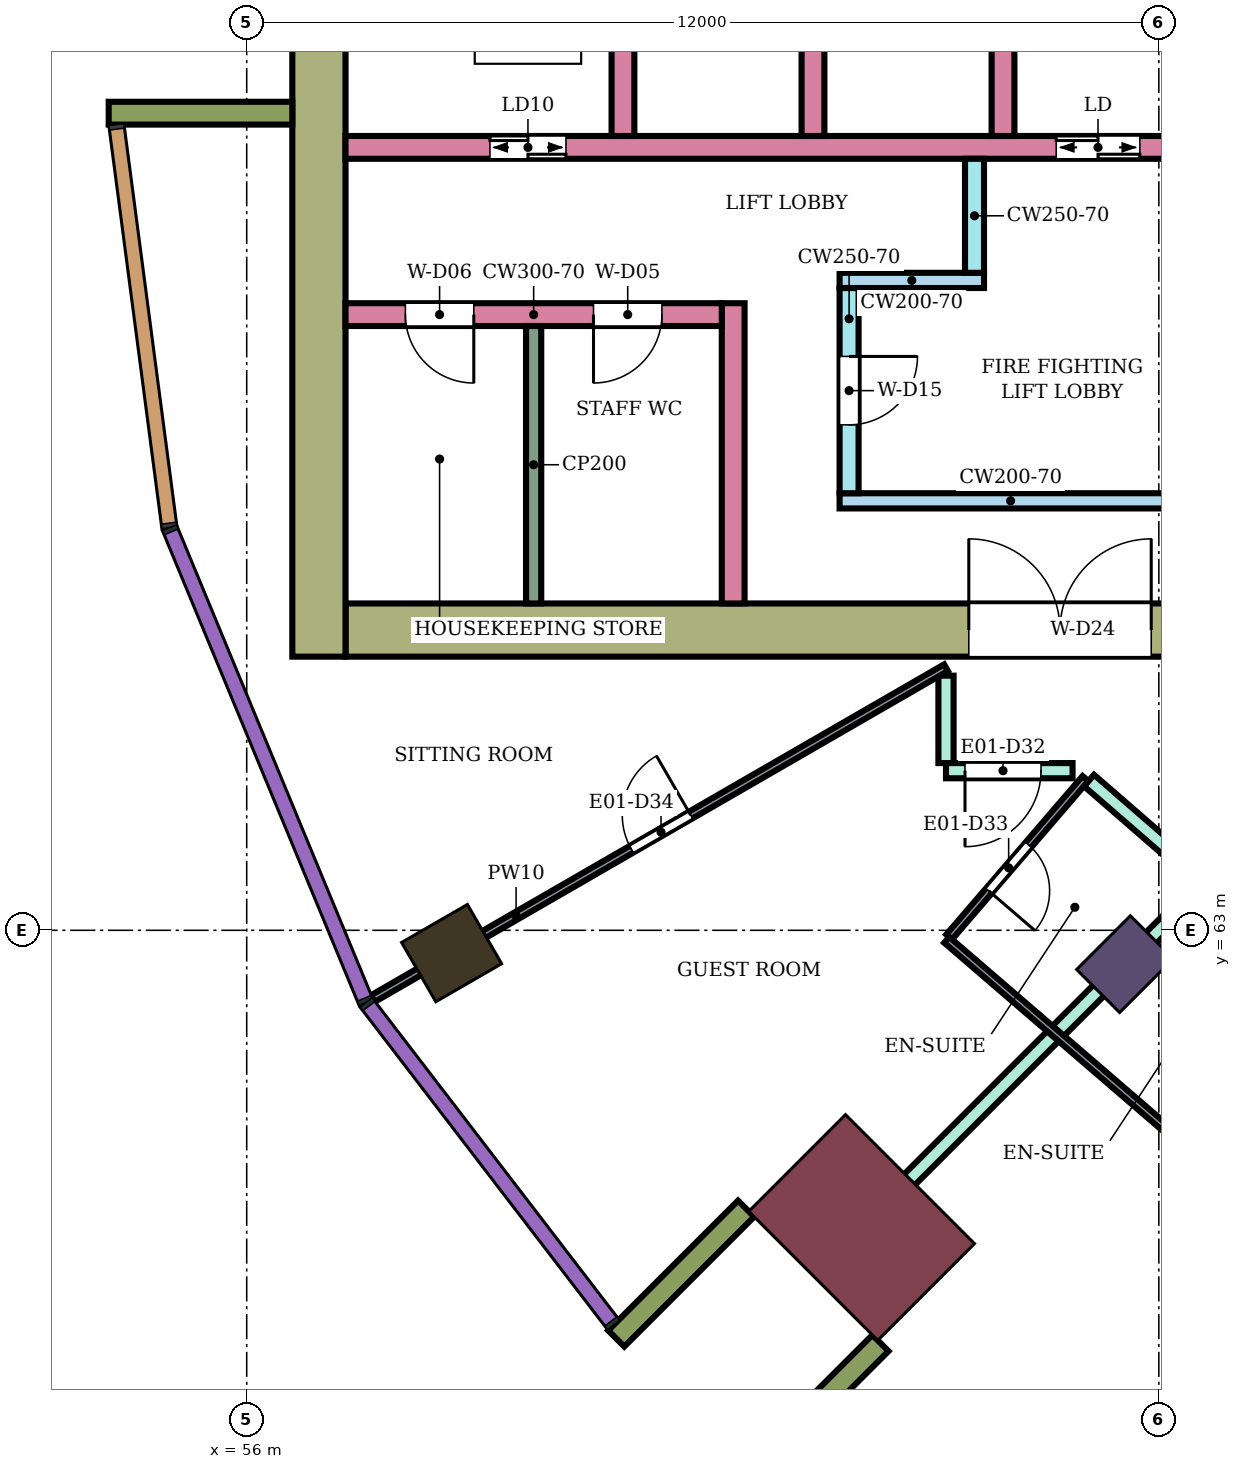
"""IFC4 building model, lengths in metres.
Left out: names, types, materials, properties, quantities, classifications, styles, units other than length and angle.
Written with IfcOpenShell. Run it as: python <this file> out.ifc"""

import sys

from ifc_helpers import new_model, si_unit, direction, frame, frame_2d, origin, origin_2d, place, context, subcontext, project, spatial, rectangle, extrude, element, fill, save


model = new_model("IFC4")
c1 = context("Model", 3, precision=1e-05, world=origin(), true_north=direction((0.0, 1.0)))
c2 = subcontext(c1, "Body", "Model", "MODEL_VIEW")
j1 = project(units=[si_unit("LENGTHUNIT", "METRE"), si_unit("PLANEANGLEUNIT", "RADIAN")], contexts=[c1])
p1 = place(None, origin())
s1 = spatial("IfcSite", under=j1, at=p1, CompositionType="ELEMENT")
p2 = place(p1, origin())
s2 = spatial("IfcBuilding", under=s1, at=p2, CompositionType="ELEMENT")
p3 = place(p2, frame((0.0, 0.0, 122.4)))
s3 = spatial("IfcBuildingStorey", under=s2, at=p3, CompositionType="ELEMENT", Elevation=122.4)
p4 = place(p3, frame((58.696, 62.7, 0.0), z_axis=(0.0, 0.0, 1.0), x_axis=(-0.866025403784, -0.5, 0.0)))
e1 = element("IfcColumn", 1, at=p4, inside=s3, PredefinedType="COLUMN", context=c2, shape_type="SweptSolid", body=[
    extrude(rectangle(XDim=1.0, YDim=0.9, at=origin_2d()), origin(), (0.0, 0.0, 1.0), 3.9),
])
p5 = place(p3, frame((67.555, 62.555, 0.0), z_axis=(0.0, 0.0, 1.0), x_axis=(-0.707106781187, -0.707106781187, 0.0)))
e2 = element("IfcColumn", 2, at=p5, inside=s3, PredefinedType="COLUMN", context=c2, shape_type="SweptSolid", body=[
    extrude(rectangle(XDim=1.0, YDim=0.8, at=origin_2d()), origin(), (0.0, 0.0, 1.0), 3.9),
])
p6 = place(p3, frame((64.09, 59.09, 0.0), z_axis=(0.0, 0.0, 1.0), x_axis=(-0.707106781187, -0.707106781187, 0.0)))
e3 = element("IfcColumn", 3, at=p6, inside=s3, PredefinedType="COLUMN", context=c2, shape_type="SweptSolid", body=[
    extrude(rectangle(XDim=1.8, YDim=2.4, at=origin_2d()), origin(), (0.0, 0.0, 1.0), 3.9),
])
p7 = place(p3, frame((72.1, 66.95, 0.0), z_axis=(0.0, 0.0, 1.0), x_axis=(-1.0, 0.0, 0.0)))
e4 = element("IfcWall", 4, at=p7, inside=s3, PredefinedType="SHEAR", context=c2, shape_type="SweptSolid", body=[
    extrude(rectangle(XDim=14.8, YDim=0.7, at=frame_2d((7.4, 0.0))), origin(), (0.0, 0.0, 1.0), 3.58),
])
p8 = place(p7, frame((4.2, 0.0, 0.0)))
e5 = element("IfcOpeningElement", 5, at=p8, cuts=e4, PredefinedType="OPENING", context=c2, shape_type="SweptSolid", body=[
    extrude(rectangle(XDim=2.4, YDim=2.4, at=frame_2d((1.2, 1.2))), frame((0.0, 0.36, 0.0), z_axis=(0.0, -1.0, 0.0), x_axis=(1.0, 0.0, 0.0)), (0.0, 0.0, 1.0), 0.72),
])
p9 = place(p3, frame((56.95, 83.4, 0.0), z_axis=(0.0, 0.0, 1.0), x_axis=(0.0, -1.0, 0.0)))
e6 = element("IfcWall", 6, at=p9, inside=s3, PredefinedType="SHEAR", context=c2, shape_type="SweptSolid", body=[
    extrude(rectangle(XDim=16.8, YDim=0.7, at=frame_2d((8.4, 0.0))), origin(), (0.0, 0.0, 1.0), 3.58),
])
p10 = place(p3, frame((68.3, 73.3, 0.0), z_axis=(0.0, 0.0, 1.0), x_axis=(-1.0, 0.0, 0.0)))
e7 = element("IfcWall", 7, at=p10, inside=s3, PredefinedType="SHEAR", context=c2, shape_type="SweptSolid", body=[
    extrude(rectangle(XDim=11.0, YDim=0.3, at=frame_2d((5.5, 0.0))), origin(), (0.0, 0.0, 1.0), 3.58),
])
p11 = place(p10, frame((0.55, 0.0, 0.0)))
e8 = element("IfcOpeningElement", 8, at=p11, cuts=e7, PredefinedType="OPENING", context=c2, shape_type="SweptSolid", body=[
    extrude(rectangle(XDim=1.1, YDim=2.1, at=frame_2d((0.55, 1.05))), frame((0.0, 0.16, 0.0), z_axis=(0.0, -1.0, 0.0), x_axis=(1.0, 0.0, 0.0)), (0.0, 0.0, 1.0), 0.32),
])
p12 = place(p10, frame((8.1, 0.0, 0.0)))
e9 = element("IfcOpeningElement", 9, at=p12, cuts=e7, PredefinedType="OPENING", context=c2, shape_type="SweptSolid", body=[
    extrude(rectangle(XDim=1.0, YDim=2.1, at=frame_2d((0.5, 1.05))), frame((0.0, 0.16, 0.0), z_axis=(0.0, -1.0, 0.0), x_axis=(1.0, 0.0, 0.0)), (0.0, 0.0, 1.0), 0.32),
])
for number, where, z_axis, x_axis in (
    (10, (65.95, 76.0, 0.0), (0.0, 0.0, 1.0), (0.0, -1.0, 0.0)),
    (11, (63.45, 76.0, 0.0), (0.0, 0.0, 1.0), (0.0, -1.0, 0.0)),
    (12, (60.95, 76.0, 0.0), (0.0, 0.0, 1.0), (0.0, -1.0, 0.0)),
):
    element("IfcWall", number, at=place(p3, frame(where, z_axis=z_axis, x_axis=x_axis)), inside=s3, PredefinedType="SHEAR", context=c2, shape_type="SweptSolid", body=[
        extrude(rectangle(XDim=2.55, YDim=0.3, at=frame_2d((1.275, 0.0))), origin(), (0.0, 0.0, 1.0), 3.58),
    ])
p13 = place(p3, frame((68.3, 68.65, 0.0), z_axis=(0.0, 0.0, 1.0), x_axis=(-1.0, 0.0, 0.0)))
e13 = element("IfcWall", 13, at=p13, inside=s3, PredefinedType="SHEAR", context=c2, shape_type="SweptSolid", body=[
    extrude(rectangle(XDim=4.5, YDim=0.2, at=frame_2d((2.25, 0.0))), origin(), (0.0, 0.0, 1.0), 3.58),
])
p14 = place(p3, frame((63.925, 71.45, 0.0), z_axis=(0.0, 0.0, 1.0), x_axis=(0.0, -1.0, 0.0)))
e14 = element("IfcWall", 14, at=p14, inside=s3, PredefinedType="SHEAR", context=c2, shape_type="SweptSolid", body=[
    extrude(rectangle(XDim=2.7, YDim=0.25, at=frame_2d((1.35, 0.0))), origin(), (0.0, 0.0, 1.0), 3.58),
])
p15 = place(p14, frame((0.9, 0.0, 0.0)))
e15 = element("IfcOpeningElement", 15, at=p15, cuts=e14, PredefinedType="OPENING", context=c2, shape_type="SweptSolid", body=[
    extrude(rectangle(XDim=0.9, YDim=2.1, at=frame_2d((0.45, 1.05))), frame((0.0, 0.135, 0.0), z_axis=(0.0, -1.0, 0.0), x_axis=(1.0, 0.0, 0.0)), (0.0, 0.0, 1.0), 0.27),
])
p16 = place(p3, frame((65.7, 71.55, 0.0), z_axis=(0.0, 0.0, 1.0), x_axis=(-1.0, 0.0, 0.0)))
e16 = element("IfcWall", 16, at=p16, inside=s3, PredefinedType="SHEAR", context=c2, shape_type="SweptSolid", body=[
    extrude(rectangle(XDim=1.9, YDim=0.2, at=frame_2d((0.95, 0.0))), origin(), (0.0, 0.0, 1.0), 3.58),
])
p17 = place(p3, frame((65.575, 73.15, 0.0), z_axis=(0.0, 0.0, 1.0), x_axis=(0.0, -1.0, 0.0)))
e17 = element("IfcWall", 17, at=p17, inside=s3, PredefinedType="SHEAR", context=c2, shape_type="SweptSolid", body=[
    extrude(rectangle(XDim=1.5, YDim=0.25, at=frame_2d((0.75, 0.0))), origin(), (0.0, 0.0, 1.0), 3.58),
])
p18 = place(p3, frame((62.4, 71.25, 0.0), z_axis=(0.0, 0.0, 1.0), x_axis=(0.0, -1.0, 0.0)))
e18 = element("IfcWall", 18, at=p18, inside=s3, PredefinedType="SHEAR", context=c2, shape_type="SweptSolid", body=[
    extrude(rectangle(XDim=3.95, YDim=0.3, at=frame_2d((1.975, 0.0))), origin(), (0.0, 0.0, 1.0), 3.58),
])
p19 = place(p3, frame((62.25, 71.1, 0.0), z_axis=(0.0, 0.0, 1.0), x_axis=(-1.0, 0.0, 0.0)))
e19 = element("IfcWall", 19, at=p19, inside=s3, PredefinedType="SHEAR", context=c2, shape_type="SweptSolid", body=[
    extrude(rectangle(XDim=4.95, YDim=0.3, at=frame_2d((2.475, 0.0))), origin(), (0.0, 0.0, 1.0), 3.58),
])
p20 = place(p19, frame((0.788, 0.0, 0.0)))
e20 = element("IfcOpeningElement", 20, at=p20, cuts=e19, PredefinedType="OPENING", context=c2, shape_type="SweptSolid", body=[
    extrude(rectangle(XDim=0.9, YDim=2.1, at=frame_2d((0.45, 1.05))), frame((0.0, 0.16, 0.0), z_axis=(0.0, -1.0, 0.0), x_axis=(1.0, 0.0, 0.0)), (0.0, 0.0, 1.0), 0.32),
])
p21 = place(p19, frame((3.262, 0.0, 0.0)))
e21 = element("IfcOpeningElement", 21, at=p21, cuts=e19, PredefinedType="OPENING", context=c2, shape_type="SweptSolid", body=[
    extrude(rectangle(XDim=0.9, YDim=2.1, at=frame_2d((0.45, 1.05))), frame((0.0, 0.16, 0.0), z_axis=(0.0, -1.0, 0.0), x_axis=(1.0, 0.0, 0.0)), (0.0, 0.0, 1.0), 0.32),
])
for number, where, z_axis, x_axis in (
    (22, (56.6, 73.75, 0.0), (0.0, 0.0, 1.0), (-1.0, 0.0, 0.0)),
    (23, (62.57, 59.338, 0.0), (0.0, 0.0, 1.0), (-0.707, -0.707, 0.0)),
    (24, (64.338, 57.57, 0.0), (0.0, 0.0, 1.0), (-0.707, -0.707, 0.0)),
):
    element("IfcWall", number, at=place(p3, frame(where, z_axis=z_axis, x_axis=x_axis)), inside=s3, PredefinedType="NOTDEFINED", context=c2, shape_type="SweptSolid", body=[
        extrude(rectangle(XDim=2.416, YDim=0.3, at=frame_2d((1.208, 0.0))), origin(), (0.0, 0.0, 1.0), 3.9),
    ])
p22 = place(p3, frame((63.596, 58.596, 0.0), z_axis=(0.0, 0.0, 1.0), x_axis=(0.707106781187, 0.707106781187, 0.0)))
e25 = element("IfcWall", 25, at=p22, inside=s3, PredefinedType="PARTITIONING", context=c2, shape_type="SweptSolid", body=[
    extrude(rectangle(XDim=7.005, YDim=0.2, at=frame_2d((3.503, 0.0))), origin(), (0.0, 0.0, 1.0), 3.45),
])
p23 = place(p3, frame((65.2, 65.2, 0.0), z_axis=(0.0, 0.0, 1.0), x_axis=(0.0, 1.0, 0.0)))
e26 = element("IfcWall", 26, at=p23, inside=s3, PredefinedType="PARTITIONING", context=c2, shape_type="SweptSolid", body=[
    extrude(rectangle(XDim=1.15, YDim=0.2, at=frame_2d((0.575, 0.0))), origin(), (0.0, 0.0, 1.0), 3.45),
])
p24 = place(p3, frame((65.2, 65.1, 0.0), z_axis=(0.0, 0.0, 1.0), x_axis=(1.0, 0.0, 0.0)))
e27 = element("IfcWall", 27, at=p24, inside=s3, PredefinedType="PARTITIONING", context=c2, shape_type="SweptSolid", body=[
    extrude(rectangle(XDim=1.665, YDim=0.2, at=frame_2d((0.833, 0.0))), origin(), (0.0, 0.0, 1.0), 3.45),
])
p25 = place(p24, frame((0.25, 0.0, 0.0)))
e28 = element("IfcOpeningElement", 28, at=p25, cuts=e27, PredefinedType="OPENING", context=c2, shape_type="SweptSolid", body=[
    extrude(rectangle(XDim=1.0, YDim=2.1, at=frame_2d((0.5, 1.05))), frame((0.0, 0.11, 0.0), z_axis=(0.0, -1.0, 0.0), x_axis=(1.0, 0.0, 0.0)), (0.0, 0.0, 1.0), 0.22),
])
p26 = place(p3, frame((67.081, 64.971, 0.0), z_axis=(0.0, 0.0, 1.0), x_axis=(0.755031061605, -0.65568902386, 0.0)))
e29 = element("IfcWall", 29, at=p26, inside=s3, PredefinedType="PARTITIONING", context=c2, shape_type="SweptSolid", body=[
    extrude(rectangle(XDim=6.186, YDim=0.2, at=frame_2d((3.093, 0.0))), origin(), (0.0, 0.0, 1.0), 3.45),
])
p27 = place(p26, frame((4.755, 0.0, 0.0)))
e30 = element("IfcOpeningElement", 30, at=p27, cuts=e29, PredefinedType="OPENING", context=c2, shape_type="SweptSolid", body=[
    extrude(rectangle(XDim=1.0, YDim=2.1, at=frame_2d((0.5, 1.05))), frame((0.0, 0.11, 0.0), z_axis=(0.0, -1.0, 0.0), x_axis=(1.0, 0.0, 0.0)), (0.0, 0.0, 1.0), 0.22),
])
p28 = place(p3, frame((67.094, 52.663, 0.0), z_axis=(0.0, 0.0, 1.0), x_axis=(0.500228134253, 0.865893650342, 0.0)))
e31 = element("IfcWall", 31, at=p28, inside=s3, PredefinedType="PARTITIONING", context=c2, shape_type="SweptSolid", body=[
    extrude(rectangle(XDim=9.375, YDim=0.2, at=frame_2d((4.687, 0.0))), origin(), (0.0, 0.0, 1.0), 3.45),
])
p29 = place(p3, frame((57.659, 62.101, 0.0), z_axis=(0.0, 0.0, 1.0), x_axis=(0.86602264145, 0.500004784474, 0.0)))
e32 = element("IfcWall", 32, at=p29, inside=s3, PredefinedType="PARTITIONING", context=c2, shape_type="SweptSolid", body=[
    extrude(rectangle(XDim=8.708, YDim=0.1, at=frame_2d((4.354, 0.0))), origin(), (0.0, 0.0, 1.0), 3.45),
])
p30 = place(p29, frame((3.929, 0.0, 0.0)))
e33 = element("IfcOpeningElement", 33, at=p30, cuts=e32, PredefinedType="OPENING", context=c2, shape_type="SweptSolid", body=[
    extrude(rectangle(XDim=0.9, YDim=2.1, at=frame_2d((0.45, 1.05))), frame((0.0, 0.06, 0.0), z_axis=(0.0, -1.0, 0.0), x_axis=(1.0, 0.0, 0.0)), (0.0, 0.0, 1.0), 0.12),
])
p31 = place(p3, frame((65.242, 62.912, 0.0), z_axis=(0.0, 0.0, 1.0), x_axis=(0.652069888227, 0.758158862553, 0.0)))
e34 = element("IfcWall", 34, at=p31, inside=s3, PredefinedType="PARTITIONING", context=c2, shape_type="SweptSolid", body=[
    extrude(rectangle(XDim=2.75, YDim=0.1, at=frame_2d((1.375, 0.0))), origin(), (0.0, 0.0, 1.0), 3.45),
])
p32 = place(p31, frame((0.8, 0.0, 0.0)))
e35 = element("IfcOpeningElement", 35, at=p32, cuts=e34, PredefinedType="OPENING", context=c2, shape_type="SweptSolid", body=[
    extrude(rectangle(XDim=0.8, YDim=2.1, at=frame_2d((0.4, 1.05))), frame((0.0, 0.06, 0.0), z_axis=(0.0, -1.0, 0.0), x_axis=(1.0, 0.0, 0.0)), (0.0, 0.0, 1.0), 0.12),
])
p33 = place(p3, frame((65.209, 62.875, 0.0), z_axis=(0.0, 0.0, 1.0), x_axis=(0.757930378138, -0.652335451969, 0.0)))
e36 = element("IfcWall", 36, at=p33, inside=s3, PredefinedType="PARTITIONING", context=c2, shape_type="SweptSolid", body=[
    extrude(rectangle(XDim=4.15, YDim=0.1, at=frame_2d((2.075, 0.0))), origin(), (0.0, 0.0, 1.0), 3.45),
])
p34 = place(p3, frame((59.775, 70.95, 0.0), z_axis=(0.0, 0.0, 1.0), x_axis=(0.0, -1.0, 0.0)))
e37 = element("IfcWall", 37, at=p34, inside=s3, PredefinedType="PARTITIONING", context=c2, shape_type="SweptSolid", body=[
    extrude(rectangle(XDim=3.65, YDim=0.2, at=frame_2d((1.825, 0.0))), origin(), (0.0, 0.0, 1.0), 3.58),
])
p35 = place(p25, frame((1.0, 0.0, 0.0), z_axis=(0.0, 0.0, 1.0), x_axis=(-1.0, 0.0, 0.0)))
e38 = element("IfcDoor", 38, at=p35, inside=s3, OperationType="SINGLE_SWING_RIGHT", PredefinedType="DOOR", context=c2, shape_type="SweptSolid", body=[
    extrude(rectangle(XDim=1.0, YDim=2.1, at=frame_2d((0.5, 1.05))), frame((0.0, 0.025, 0.0), z_axis=(0.0, -1.0, 0.0), x_axis=(1.0, 0.0, 0.0)), (0.0, 0.0, 1.0), 0.05),
])
fill(e28, e38)
p36 = place(p32, frame((0.8, 0.0, 0.0), z_axis=(0.0, 0.0, 1.0), x_axis=(-1.0, 0.0, 0.0)))
e39 = element("IfcDoor", 39, at=p36, inside=s3, OperationType="SINGLE_SWING_RIGHT", PredefinedType="DOOR", context=c2, shape_type="SweptSolid", body=[
    extrude(rectangle(XDim=0.8, YDim=2.1, at=frame_2d((0.4, 1.05))), frame((0.0, 0.025, 0.0), z_axis=(0.0, -1.0, 0.0), x_axis=(1.0, 0.0, 0.0)), (0.0, 0.0, 1.0), 0.05),
])
fill(e35, e39)
p37 = place(p30, origin())
e40 = element("IfcDoor", 40, at=p37, inside=s3, OperationType="SINGLE_SWING_RIGHT", PredefinedType="DOOR", context=c2, shape_type="SweptSolid", body=[
    extrude(rectangle(XDim=0.9, YDim=2.1, at=frame_2d((0.45, 1.05))), frame((0.0, 0.025, 0.0), z_axis=(0.0, -1.0, 0.0), x_axis=(1.0, 0.0, 0.0)), (0.0, 0.0, 1.0), 0.05),
])
fill(e33, e40)
p38 = place(p11, origin())
e41 = element("IfcDoor", 41, at=p38, inside=s3, OperationType="DOUBLE_DOOR_SLIDING", PredefinedType="DOOR", context=c2, shape_type="SweptSolid", body=[
    extrude(rectangle(XDim=1.1, YDim=2.1, at=frame_2d((0.55, 1.05))), frame((0.0, 0.025, 0.0), z_axis=(0.0, -1.0, 0.0), x_axis=(1.0, 0.0, 0.0)), (0.0, 0.0, 1.0), 0.05),
])
fill(e8, e41)
p39 = place(p12, origin())
e42 = element("IfcDoor", 42, at=p39, inside=s3, OperationType="DOUBLE_DOOR_SLIDING", PredefinedType="DOOR", context=c2, shape_type="SweptSolid", body=[
    extrude(rectangle(XDim=1.0, YDim=2.1, at=frame_2d((0.5, 1.05))), frame((0.0, 0.025, 0.0), z_axis=(0.0, -1.0, 0.0), x_axis=(1.0, 0.0, 0.0)), (0.0, 0.0, 1.0), 0.05),
])
fill(e9, e42)
p40 = place(p15, origin())
e43 = element("IfcDoor", 43, at=p40, inside=s3, OperationType="SINGLE_SWING_LEFT", PredefinedType="DOOR", context=c2, shape_type="SweptSolid", body=[
    extrude(rectangle(XDim=0.9, YDim=2.1, at=frame_2d((0.45, 1.05))), frame((0.0, 0.025, 0.0), z_axis=(0.0, -1.0, 0.0), x_axis=(1.0, 0.0, 0.0)), (0.0, 0.0, 1.0), 0.05),
])
fill(e15, e43)
p41 = place(p20, origin())
e44 = element("IfcDoor", 44, at=p41, inside=s3, OperationType="SINGLE_SWING_RIGHT", PredefinedType="DOOR", context=c2, shape_type="SweptSolid", body=[
    extrude(rectangle(XDim=0.9, YDim=2.1, at=frame_2d((0.45, 1.05))), frame((0.0, 0.025, 0.0), z_axis=(0.0, -1.0, 0.0), x_axis=(1.0, 0.0, 0.0)), (0.0, 0.0, 1.0), 0.05),
])
fill(e20, e44)
p42 = place(p21, origin())
e45 = element("IfcDoor", 45, at=p42, inside=s3, OperationType="SINGLE_SWING_LEFT", PredefinedType="DOOR", context=c2, shape_type="SweptSolid", body=[
    extrude(rectangle(XDim=0.9, YDim=2.1, at=frame_2d((0.45, 1.05))), frame((0.0, 0.025, 0.0), z_axis=(0.0, -1.0, 0.0), x_axis=(1.0, 0.0, 0.0)), (0.0, 0.0, 1.0), 0.05),
])
fill(e21, e45)
p43 = place(p8, frame((2.4, 0.0, 0.0), z_axis=(0.0, 0.0, 1.0), x_axis=(-1.0, 0.0, 0.0)))
e46 = element("IfcDoor", 46, at=p43, inside=s3, OperationType="DOUBLE_DOOR_SINGLE_SWING", PredefinedType="DOOR", context=c2, shape_type="SweptSolid", body=[
    extrude(rectangle(XDim=2.4, YDim=2.4, at=frame_2d((1.2, 1.2))), frame((0.0, 0.025, 0.0), z_axis=(0.0, -1.0, 0.0), x_axis=(1.0, 0.0, 0.0)), (0.0, 0.0, 1.0), 0.05),
])
fill(e5, e46)
save(model, sys.argv[1])
